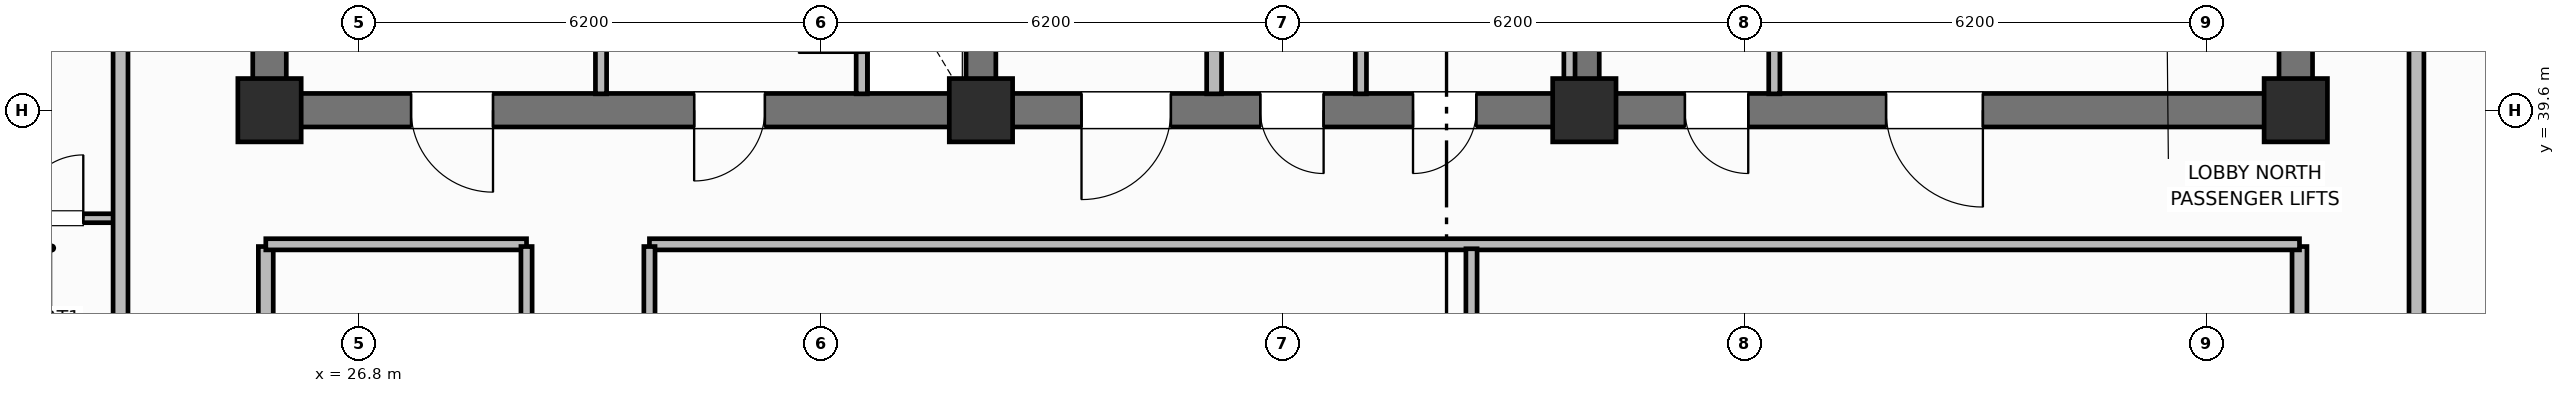
"""IFC4 building model, lengths in metres.
Left out: names, types, materials, properties, quantities, classifications, styles, units other than length and angle.
Written with IfcOpenShell. Run it as: python <this file> out.ifc"""

import sys

from ifc_helpers import new_model, si_unit, direction, frame, frame_2d, origin, origin_2d, place, context, subcontext, project, spatial, rectangle, extrude, element, fill, save


model = new_model("IFC4")
c1 = context("Model", 3, precision=1e-05, world=origin(), true_north=direction((0.0, 1.0)))
c2 = subcontext(c1, "Body", "Model", "MODEL_VIEW")
j1 = project(units=[si_unit("LENGTHUNIT", "METRE"), si_unit("PLANEANGLEUNIT", "RADIAN")], contexts=[c1])
p1 = place(None, origin())
s1 = spatial("IfcSite", under=j1, at=p1, CompositionType="ELEMENT")
p2 = place(p1, origin())
s2 = spatial("IfcBuilding", under=s1, at=p2, CompositionType="ELEMENT")
p3 = place(p2, frame((0.0, 0.0, 251.7)))
s3 = spatial("IfcBuildingStorey", under=s2, at=p3, CompositionType="ELEMENT", Elevation=251.7)
for number, where, z_axis, x_axis in (
    (1, (25.6, 39.825, 0.0), (0.0, 0.0, 1.0), (0.0, 1.0, 0.0)),
    (2, (52.8, 39.825, 0.0), (0.0, 0.0, 1.0), (0.0, 1.0, 0.0)),
):
    element("IfcWall", number, at=place(p3, frame(where, z_axis=z_axis, x_axis=x_axis)), inside=s3, PredefinedType="SHEAR", context=c2, shape_type="SweptSolid", body=[
        extrude(rectangle(XDim=5.75, YDim=0.45, at=frame_2d((2.875, 0.0))), origin(), (0.0, 0.0, 1.0), 3.7),
    ])
p4 = place(p3, frame((52.8, 39.6, 0.0), z_axis=(0.0, 0.0, 1.0), x_axis=(-1.0, 0.0, 0.0)))
e3 = element("IfcWall", 3, at=p4, inside=s3, PredefinedType="SHEAR", context=c2, shape_type="SweptSolid", body=[
    extrude(rectangle(XDim=27.2, YDim=0.45, at=frame_2d((13.6, 0.0))), origin(), (0.0, 0.0, 1.0), 3.7),
])
p5 = place(p4, frame((24.2, 0.0, 0.0)))
e4 = element("IfcOpeningElement", 4, at=p5, cuts=e3, PredefinedType="OPENING", context=c2, shape_type="SweptSolid", body=[
    extrude(rectangle(XDim=1.1, YDim=2.15, at=frame_2d((0.55, 1.075))), frame((0.0, 0.235, 0.0), z_axis=(0.0, -1.0, 0.0), x_axis=(1.0, 0.0, 0.0)), (0.0, 0.0, 1.0), 0.47),
])
p6 = place(p4, frame((20.55, 0.0, 0.0)))
e5 = element("IfcOpeningElement", 5, at=p6, cuts=e3, PredefinedType="OPENING", context=c2, shape_type="SweptSolid", body=[
    extrude(rectangle(XDim=0.95, YDim=2.1, at=frame_2d((0.475, 1.05))), frame((0.0, 0.235, 0.0), z_axis=(0.0, -1.0, 0.0), x_axis=(1.0, 0.0, 0.0)), (0.0, 0.0, 1.0), 0.47),
])
p7 = place(p4, frame((15.1, 0.0, 0.0)))
e6 = element("IfcOpeningElement", 6, at=p7, cuts=e3, PredefinedType="OPENING", context=c2, shape_type="SweptSolid", body=[
    extrude(rectangle(XDim=1.2, YDim=2.15, at=frame_2d((0.6, 1.075))), frame((0.0, 0.235, 0.0), z_axis=(0.0, -1.0, 0.0), x_axis=(1.0, 0.0, 0.0)), (0.0, 0.0, 1.0), 0.47),
])
p8 = place(p4, frame((13.05, 0.0, 0.0)))
e7 = element("IfcOpeningElement", 7, at=p8, cuts=e3, PredefinedType="OPENING", context=c2, shape_type="SweptSolid", body=[
    extrude(rectangle(XDim=0.85, YDim=2.1, at=frame_2d((0.425, 1.05))), frame((0.0, 0.235, 0.0), z_axis=(0.0, -1.0, 0.0), x_axis=(1.0, 0.0, 0.0)), (0.0, 0.0, 1.0), 0.47),
])
p9 = place(p4, frame((11.0, 0.0, 0.0)))
e8 = element("IfcOpeningElement", 8, at=p9, cuts=e3, PredefinedType="OPENING", context=c2, shape_type="SweptSolid", body=[
    extrude(rectangle(XDim=0.85, YDim=2.1, at=frame_2d((0.425, 1.05))), frame((0.0, 0.235, 0.0), z_axis=(0.0, -1.0, 0.0), x_axis=(1.0, 0.0, 0.0)), (0.0, 0.0, 1.0), 0.47),
])
p10 = place(p4, frame((7.35, 0.0, 0.0)))
e9 = element("IfcOpeningElement", 9, at=p10, cuts=e3, PredefinedType="OPENING", context=c2, shape_type="SweptSolid", body=[
    extrude(rectangle(XDim=0.85, YDim=2.1, at=frame_2d((0.425, 1.05))), frame((0.0, 0.235, 0.0), z_axis=(0.0, -1.0, 0.0), x_axis=(1.0, 0.0, 0.0)), (0.0, 0.0, 1.0), 0.47),
])
p11 = place(p4, frame((4.2, 0.0, 0.0)))
e10 = element("IfcOpeningElement", 10, at=p11, cuts=e3, PredefinedType="OPENING", context=c2, shape_type="SweptSolid", body=[
    extrude(rectangle(XDim=1.3, YDim=2.2, at=frame_2d((0.65, 1.1))), frame((0.0, 0.235, 0.0), z_axis=(0.0, -1.0, 0.0), x_axis=(1.0, 0.0, 0.0)), (0.0, 0.0, 1.0), 0.47),
])
for number, where, z_axis, x_axis in (
    (11, (35.15, 39.825, 0.0), (0.0, 0.0, 1.0), (0.0, 1.0, 0.0)),
    (12, (43.25, 39.825, 0.0), (0.0, 0.0, 1.0), (0.0, 1.0, 0.0)),
):
    element("IfcWall", number, at=place(p3, frame(where, z_axis=z_axis, x_axis=x_axis)), inside=s3, PredefinedType="SHEAR", context=c2, shape_type="SweptSolid", body=[
        extrude(rectangle(XDim=5.75, YDim=0.4, at=frame_2d((2.875, 0.0))), origin(), (0.0, 0.0, 1.0), 3.7),
    ])
for number, where, z_axis, x_axis in (
    (13, (25.6, 39.6, 0.0), (0.0, 0.0, 1.0), (1.0, 0.0, 0.0)),
    (14, (35.15, 39.6, 0.0), (0.0, 0.0, 1.0), (1.0, 0.0, 0.0)),
    (15, (43.25, 39.6, 0.0), (0.0, 0.0, 1.0), (1.0, 0.0, 0.0)),
    (16, (52.8, 39.6, 0.0), (0.0, 0.0, 1.0), (1.0, 0.0, 0.0)),
):
    element("IfcColumn", number, at=place(p3, frame(where, z_axis=z_axis, x_axis=x_axis)), inside=s3, PredefinedType="COLUMN", context=c2, shape_type="SweptSolid", body=[
        extrude(rectangle(XDim=0.85, YDim=0.85, at=origin_2d()), origin(), (0.0, 0.0, 1.0), 3.7),
    ])
p12 = place(p3, frame((33.55, 39.82, 0.0), z_axis=(0.0, 0.0, 1.0), x_axis=(0.0, 1.0, 0.0)))
e17 = element("IfcWall", 17, at=p12, inside=s3, PredefinedType="PARTITIONING", context=c2, shape_type="SweptSolid", body=[
    extrude(rectangle(XDim=2.13, YDim=0.15, at=frame_2d((1.065, 0.0))), origin(), (0.0, 0.0, 1.0), 2.56),
])
p13 = place(p12, frame((0.55, 0.0, 0.0)))
e18 = element("IfcOpeningElement", 18, at=p13, cuts=e17, PredefinedType="OPENING", context=c2, shape_type="SweptSolid", body=[
    extrude(rectangle(XDim=0.85, YDim=2.05, at=frame_2d((0.425, 1.025))), frame((0.0, 0.085, 0.0), z_axis=(0.0, -1.0, 0.0), x_axis=(1.0, 0.0, 0.0)), (0.0, 0.0, 1.0), 0.17),
])
p14 = place(p3, frame((30.05, 39.82, 0.0), z_axis=(0.0, 0.0, 1.0), x_axis=(0.0, 1.0, 0.0)))
e19 = element("IfcWall", 19, at=p14, inside=s3, PredefinedType="PARTITIONING", context=c2, shape_type="SweptSolid", body=[
    extrude(rectangle(XDim=2.13, YDim=0.15, at=frame_2d((1.065, 0.0))), origin(), (0.0, 0.0, 1.0), 2.56),
])
p15 = place(p3, frame((38.28, 39.82, 0.0), z_axis=(0.0, 0.0, 1.0), x_axis=(0.0, 1.0, 0.0)))
e20 = element("IfcWall", 20, at=p15, inside=s3, PredefinedType="PARTITIONING", context=c2, shape_type="SweptSolid", body=[
    extrude(rectangle(XDim=5.63, YDim=0.2, at=frame_2d((2.815, 0.0))), origin(), (0.0, 0.0, 1.0), 2.56),
])
for number, where, z_axis, x_axis in (
    (21, (43.05, 39.82, 0.0), (0.0, 0.0, 1.0), (0.0, 1.0, 0.0)),
    (22, (40.25, 39.82, 0.0), (0.0, 0.0, 1.0), (0.0, 1.0, 0.0)),
    (23, (45.8, 39.82, 0.0), (0.0, 0.0, 1.0), (0.0, 1.0, 0.0)),
):
    element("IfcWall", number, at=place(p3, frame(where, z_axis=z_axis, x_axis=x_axis)), inside=s3, PredefinedType="PARTITIONING", context=c2, shape_type="SweptSolid", body=[
        extrude(rectangle(XDim=5.63, YDim=0.15, at=frame_2d((2.815, 0.0))), origin(), (0.0, 0.0, 1.0), 2.56),
    ])
for number, where, z_axis, x_axis in (
    (24, (25.55, 18.63, 0.0), (0.0, 0.0, 1.0), (0.0, 1.0, 0.0)),
    (25, (52.85, 18.63, 0.0), (0.0, 0.0, 1.0), (0.0, 1.0, 0.0)),
):
    element("IfcWall", number, at=place(p3, frame(where, z_axis=z_axis, x_axis=x_axis)), inside=s3, PredefinedType="PARTITIONING", context=c2, shape_type="SweptSolid", body=[
        extrude(rectangle(XDim=19.14, YDim=0.2, at=frame_2d((9.57, 0.0))), origin(), (0.0, 0.0, 1.0), 2.56),
    ])
p16 = place(p3, frame((25.55, 37.8, 0.0), z_axis=(0.0, 0.0, 1.0), x_axis=(1.0, 0.0, 0.0)))
e26 = element("IfcWall", 26, at=p16, inside=s3, PredefinedType="PARTITIONING", context=c2, shape_type="SweptSolid", body=[
    extrude(rectangle(XDim=3.5, YDim=0.15, at=frame_2d((1.75, 0.0))), origin(), (0.0, 0.0, 1.0), 2.56),
])
p17 = place(p3, frame((30.7, 37.8, 0.0), z_axis=(0.0, 0.0, 1.0), x_axis=(1.0, 0.0, 0.0)))
e27 = element("IfcWall", 27, at=p17, inside=s3, PredefinedType="PARTITIONING", context=c2, shape_type="SweptSolid", body=[
    extrude(rectangle(XDim=22.15, YDim=0.15, at=frame_2d((11.075, 0.0))), origin(), (0.0, 0.0, 1.0), 2.56),
])
p18 = place(p3, frame((41.735, 18.66, 0.0), z_axis=(0.0, 0.0, 1.0), x_axis=(0.0, 1.0, 0.0)))
e28 = element("IfcWall", 28, at=p18, inside=s3, PredefinedType="PARTITIONING", context=c2, shape_type="SweptSolid", body=[
    extrude(rectangle(XDim=19.08, YDim=0.15, at=frame_2d((9.54, 0.0))), origin(), (0.0, 0.0, 1.0), 2.56),
])
p19 = place(p18, frame((6.5, 0.0, 0.0)))
e29 = element("IfcOpeningElement", 29, at=p19, cuts=e28, PredefinedType="OPENING", context=c2, shape_type="SweptSolid", body=[
    extrude(rectangle(XDim=1.0, YDim=2.15, at=frame_2d((0.5, 1.075))), frame((0.0, 0.085, 0.0), z_axis=(0.0, -1.0, 0.0), x_axis=(1.0, 0.0, 0.0)), (0.0, 0.0, 1.0), 0.17),
])
p20 = place(p3, frame((29.05, 18.63, 0.0), z_axis=(0.0, 0.0, 1.0), x_axis=(0.0, 1.0, 0.0)))
e30 = element("IfcWall", 30, at=p20, inside=s3, PredefinedType="PARTITIONING", context=c2, shape_type="SweptSolid", body=[
    extrude(rectangle(XDim=19.14, YDim=0.15, at=frame_2d((9.57, 0.0))), origin(), (0.0, 0.0, 1.0), 2.56),
])
p21 = place(p20, frame((5.5, 0.0, 0.0)))
e31 = element("IfcOpeningElement", 31, at=p21, cuts=e30, PredefinedType="OPENING", context=c2, shape_type="SweptSolid", body=[
    extrude(rectangle(XDim=1.0, YDim=2.15, at=frame_2d((0.5, 1.075))), frame((0.0, 0.085, 0.0), z_axis=(0.0, -1.0, 0.0), x_axis=(1.0, 0.0, 0.0)), (0.0, 0.0, 1.0), 0.17),
])
p22 = place(p3, frame((30.7, 18.63, 0.0), z_axis=(0.0, 0.0, 1.0), x_axis=(0.0, 1.0, 0.0)))
e32 = element("IfcWall", 32, at=p22, inside=s3, PredefinedType="PARTITIONING", context=c2, shape_type="SweptSolid", body=[
    extrude(rectangle(XDim=19.14, YDim=0.15, at=frame_2d((9.57, 0.0))), origin(), (0.0, 0.0, 1.0), 2.56),
])
p23 = place(p22, frame((5.5, 0.0, 0.0)))
e33 = element("IfcOpeningElement", 33, at=p23, cuts=e32, PredefinedType="OPENING", context=c2, shape_type="SweptSolid", body=[
    extrude(rectangle(XDim=1.0, YDim=2.15, at=frame_2d((0.5, 1.075))), frame((0.0, 0.085, 0.0), z_axis=(0.0, -1.0, 0.0), x_axis=(1.0, 0.0, 0.0)), (0.0, 0.0, 1.0), 0.17),
])
p24 = place(p3, frame((21.65, 38.15, 0.0), z_axis=(0.0, 0.0, 1.0), x_axis=(1.0, 0.0, 0.0)))
e34 = element("IfcWall", 34, at=p24, inside=s3, PredefinedType="PARTITIONING", context=c2, shape_type="SweptSolid", body=[
    extrude(rectangle(XDim=1.95, YDim=0.12, at=frame_2d((0.975, 0.0))), origin(), (0.0, 0.0, 1.0), 2.56),
])
p25 = place(p24, frame((0.6, 0.0, 0.0)))
e35 = element("IfcOpeningElement", 35, at=p25, cuts=e34, PredefinedType="OPENING", context=c2, shape_type="SweptSolid", body=[
    extrude(rectangle(XDim=0.85, YDim=2.1, at=frame_2d((0.425, 1.05))), frame((0.0, 0.07, 0.0), z_axis=(0.0, -1.0, 0.0), x_axis=(1.0, 0.0, 0.0)), (0.0, 0.0, 1.0), 0.14),
])
p26 = place(p3, frame((23.6, 9.95, 0.0), z_axis=(0.0, 0.0, 1.0), x_axis=(0.0, 1.0, 0.0)))
e36 = element("IfcWall", 36, at=p26, inside=s3, PredefinedType="PARTITIONING", context=c2, shape_type="SweptSolid", body=[
    extrude(rectangle(XDim=36.5, YDim=0.2, at=frame_2d((18.25, 0.0))), origin(), (0.0, 0.0, 1.0), 2.56),
])
p27 = place(p26, frame((3.25, 0.0, 0.0)))
e37 = element("IfcOpeningElement", 37, at=p27, cuts=e36, PredefinedType="OPENING", context=c2, shape_type="SweptSolid", body=[
    extrude(rectangle(XDim=1.0, YDim=2.15, at=frame_2d((0.5, 1.075))), frame((0.0, 0.11, 0.0), z_axis=(0.0, -1.0, 0.0), x_axis=(1.0, 0.0, 0.0)), (0.0, 0.0, 1.0), 0.22),
])
p28 = place(p26, frame((23.5, 0.0, 0.0)))
e38 = element("IfcOpeningElement", 38, at=p28, cuts=e36, PredefinedType="OPENING", context=c2, shape_type="SweptSolid", body=[
    extrude(rectangle(XDim=1.0, YDim=2.15, at=frame_2d((0.5, 1.075))), frame((0.0, 0.11, 0.0), z_axis=(0.0, -1.0, 0.0), x_axis=(1.0, 0.0, 0.0)), (0.0, 0.0, 1.0), 0.22),
])
p29 = place(p3, frame((54.42, 9.95, 0.0), z_axis=(0.0, 0.0, 1.0), x_axis=(0.0, 1.0, 0.0)))
e39 = element("IfcWall", 39, at=p29, inside=s3, PredefinedType="PARTITIONING", context=c2, shape_type="SweptSolid", body=[
    extrude(rectangle(XDim=36.5, YDim=0.2, at=frame_2d((18.25, 0.0))), origin(), (0.0, 0.0, 1.0), 2.56),
])
p30 = place(p29, frame((3.25, 0.0, 0.0)))
e40 = element("IfcOpeningElement", 40, at=p30, cuts=e39, PredefinedType="OPENING", context=c2, shape_type="SweptSolid", body=[
    extrude(rectangle(XDim=1.0, YDim=2.15, at=frame_2d((0.5, 1.075))), frame((0.0, 0.11, 0.0), z_axis=(0.0, -1.0, 0.0), x_axis=(1.0, 0.0, 0.0)), (0.0, 0.0, 1.0), 0.22),
])
p31 = place(p13, origin())
e41 = element("IfcDoor", 41, at=p31, inside=s3, OperationType="SINGLE_SWING_LEFT", PredefinedType="TRAPDOOR", context=c2, shape_type="SweptSolid", body=[
    extrude(rectangle(XDim=0.85, YDim=2.05, at=frame_2d((0.425, 1.025))), frame((0.0, 0.025, 0.0), z_axis=(0.0, -1.0, 0.0), x_axis=(1.0, 0.0, 0.0)), (0.0, 0.0, 1.0), 0.05),
])
fill(e18, e41)
p32 = place(p25, origin())
e42 = element("IfcDoor", 42, at=p32, inside=s3, OperationType="SINGLE_SWING_RIGHT", PredefinedType="DOOR", context=c2, shape_type="SweptSolid", body=[
    extrude(rectangle(XDim=0.85, YDim=2.1, at=frame_2d((0.425, 1.05))), frame((0.0, 0.025, 0.0), z_axis=(0.0, -1.0, 0.0), x_axis=(1.0, 0.0, 0.0)), (0.0, 0.0, 1.0), 0.05),
])
fill(e35, e42)
p33 = place(p5, origin())
e43 = element("IfcDoor", 43, at=p33, inside=s3, OperationType="SINGLE_SWING_LEFT", PredefinedType="DOOR", context=c2, shape_type="SweptSolid", body=[
    extrude(rectangle(XDim=1.1, YDim=2.15, at=frame_2d((0.55, 1.075))), frame((0.0, 0.025, 0.0), z_axis=(0.0, -1.0, 0.0), x_axis=(1.0, 0.0, 0.0)), (0.0, 0.0, 1.0), 0.05),
])
fill(e4, e43)
p34 = place(p6, origin())
e44 = element("IfcDoor", 44, at=p34, inside=s3, OperationType="SINGLE_SWING_RIGHT", PredefinedType="DOOR", context=c2, shape_type="SweptSolid", body=[
    extrude(rectangle(XDim=0.95, YDim=2.1, at=frame_2d((0.475, 1.05))), frame((0.0, 0.025, 0.0), z_axis=(0.0, -1.0, 0.0), x_axis=(1.0, 0.0, 0.0)), (0.0, 0.0, 1.0), 0.05),
])
fill(e5, e44)
p35 = place(p7, origin())
e45 = element("IfcDoor", 45, at=p35, inside=s3, OperationType="SINGLE_SWING_RIGHT", PredefinedType="DOOR", context=c2, shape_type="SweptSolid", body=[
    extrude(rectangle(XDim=1.2, YDim=2.15, at=frame_2d((0.6, 1.075))), frame((0.0, 0.025, 0.0), z_axis=(0.0, -1.0, 0.0), x_axis=(1.0, 0.0, 0.0)), (0.0, 0.0, 1.0), 0.05),
])
fill(e6, e45)
p36 = place(p8, origin())
e46 = element("IfcDoor", 46, at=p36, inside=s3, OperationType="SINGLE_SWING_LEFT", PredefinedType="DOOR", context=c2, shape_type="SweptSolid", body=[
    extrude(rectangle(XDim=0.85, YDim=2.1, at=frame_2d((0.425, 1.05))), frame((0.0, 0.025, 0.0), z_axis=(0.0, -1.0, 0.0), x_axis=(1.0, 0.0, 0.0)), (0.0, 0.0, 1.0), 0.05),
])
fill(e7, e46)
p37 = place(p9, origin())
e47 = element("IfcDoor", 47, at=p37, inside=s3, OperationType="SINGLE_SWING_RIGHT", PredefinedType="DOOR", context=c2, shape_type="SweptSolid", body=[
    extrude(rectangle(XDim=0.85, YDim=2.1, at=frame_2d((0.425, 1.05))), frame((0.0, 0.025, 0.0), z_axis=(0.0, -1.0, 0.0), x_axis=(1.0, 0.0, 0.0)), (0.0, 0.0, 1.0), 0.05),
])
fill(e8, e47)
p38 = place(p10, origin())
e48 = element("IfcDoor", 48, at=p38, inside=s3, OperationType="SINGLE_SWING_LEFT", PredefinedType="DOOR", context=c2, shape_type="SweptSolid", body=[
    extrude(rectangle(XDim=0.85, YDim=2.1, at=frame_2d((0.425, 1.05))), frame((0.0, 0.025, 0.0), z_axis=(0.0, -1.0, 0.0), x_axis=(1.0, 0.0, 0.0)), (0.0, 0.0, 1.0), 0.05),
])
fill(e9, e48)
p39 = place(p11, origin())
e49 = element("IfcDoor", 49, at=p39, inside=s3, OperationType="SINGLE_SWING_LEFT", PredefinedType="DOOR", context=c2, shape_type="SweptSolid", body=[
    extrude(rectangle(XDim=1.3, YDim=2.2, at=frame_2d((0.65, 1.1))), frame((0.0, 0.025, 0.0), z_axis=(0.0, -1.0, 0.0), x_axis=(1.0, 0.0, 0.0)), (0.0, 0.0, 1.0), 0.05),
])
fill(e10, e49)
save(model, sys.argv[1])
